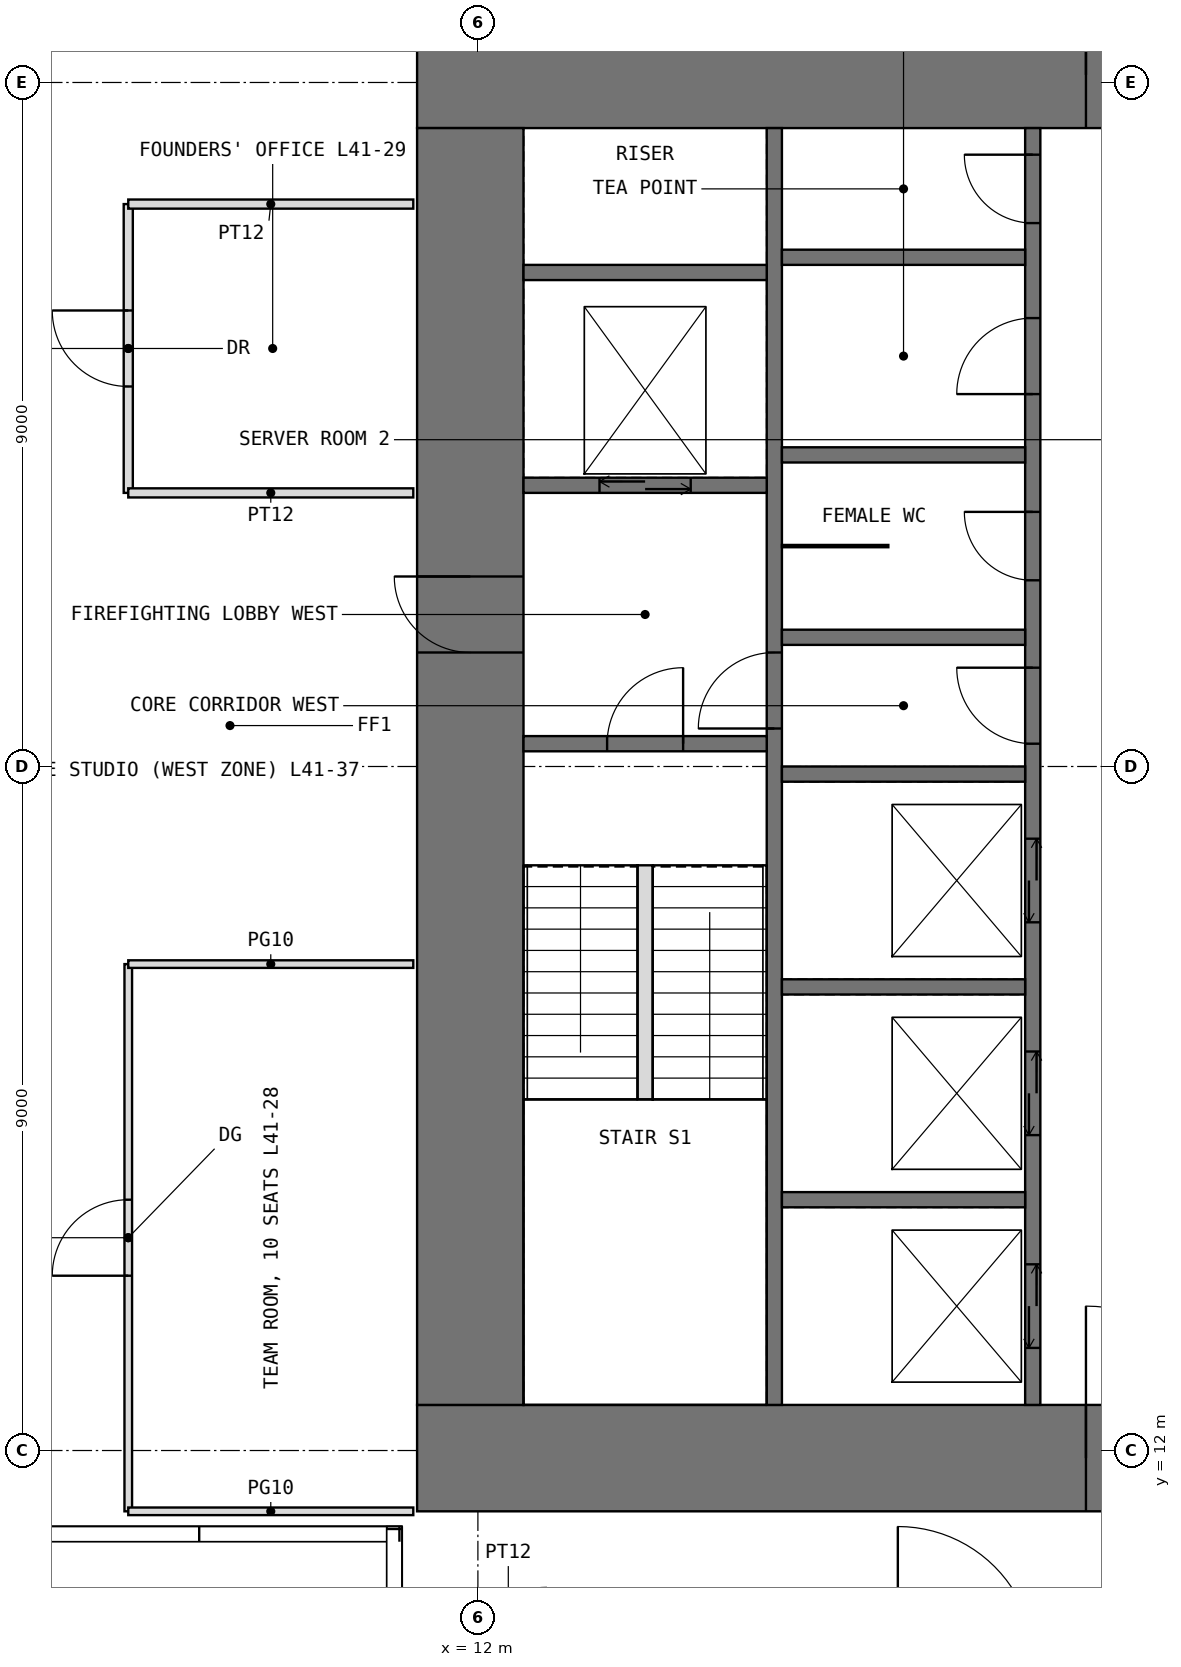
"""IFC4 building model, lengths in metres.
Left out: names, types, materials, properties, quantities, classifications, styles, units other than length and angle.
Written with IfcOpenShell. Run it as: python <this file> out.ifc"""

import sys

from ifc_helpers import new_model, si_unit, direction, frame, frame_2d, origin, place, context, subcontext, project, spatial, rectangle, extrude, element, fill, save


model = new_model("IFC4")
c1 = context("Model", 3, precision=1e-05, world=origin(), true_north=direction((0.0, 1.0)))
c2 = subcontext(c1, "Body", "Model", "MODEL_VIEW")
j1 = project(units=[si_unit("LENGTHUNIT", "METRE"), si_unit("PLANEANGLEUNIT", "RADIAN")], contexts=[c1])
p1 = place(None, origin())
s1 = spatial("IfcSite", under=j1, at=p1, CompositionType="ELEMENT")
p2 = place(p1, origin())
s2 = spatial("IfcBuilding", under=s1, at=p2, CompositionType="ELEMENT")
p3 = place(p2, frame((0.0, 0.0, 174.5)))
s3 = spatial("IfcBuildingStorey", under=s2, at=p3, CompositionType="ELEMENT", Elevation=174.5)
p4 = place(p3, frame((11.2, 11.9, -0.05), z_axis=(0.0, 0.0, 1.0), x_axis=(1.0, 0.0, 0.0)))
e1 = element("IfcWall", 1, at=p4, inside=s3, PredefinedType="SHEAR", context=c2, shape_type="SweptSolid", body=[
    extrude(rectangle(XDim=19.6, YDim=1.4, at=frame_2d((9.8, 0.0))), origin(), (0.0, 0.0, 1.0), 4.0),
])
p5 = place(p4, frame((8.8, 0.0, 0.05)))
e2 = element("IfcOpeningElement", 2, at=p5, cuts=e1, PredefinedType="OPENING", context=c2, shape_type="SweptSolid", body=[
    extrude(rectangle(XDim=2.0, YDim=2.2, at=frame_2d((1.0, 1.1))), frame((0.0, 0.71, 0.0), z_axis=(0.0, -1.0, 0.0), x_axis=(1.0, 0.0, 0.0)), (0.0, 0.0, 1.0), 1.42),
])
p6 = place(p3, frame((11.2, 30.1, -0.05), z_axis=(0.0, 0.0, 1.0), x_axis=(1.0, 0.0, 0.0)))
e3 = element("IfcWall", 3, at=p6, inside=s3, PredefinedType="SHEAR", context=c2, shape_type="SweptSolid", body=[
    extrude(rectangle(XDim=19.6, YDim=1.4, at=frame_2d((9.8, 0.0))), origin(), (0.0, 0.0, 1.0), 4.0),
])
p7 = place(p6, frame((8.8, 0.0, 0.05)))
e4 = element("IfcOpeningElement", 4, at=p7, cuts=e3, PredefinedType="OPENING", context=c2, shape_type="SweptSolid", body=[
    extrude(rectangle(XDim=2.0, YDim=2.2, at=frame_2d((1.0, 1.1))), frame((0.0, 0.71, 0.0), z_axis=(0.0, -1.0, 0.0), x_axis=(1.0, 0.0, 0.0)), (0.0, 0.0, 1.0), 1.42),
])
p8 = place(p3, frame((11.9, 12.6, -0.05), z_axis=(0.0, 0.0, 1.0), x_axis=(0.0, 1.0, 0.0)))
e5 = element("IfcWall", 5, at=p8, inside=s3, PredefinedType="SHEAR", context=c2, shape_type="SweptSolid", body=[
    extrude(rectangle(XDim=16.8, YDim=1.4, at=frame_2d((8.4, 0.0))), origin(), (0.0, 0.0, 1.0), 4.0),
])
p9 = place(p8, frame((9.9, 0.0, 0.05)))
e6 = element("IfcOpeningElement", 6, at=p9, cuts=e5, PredefinedType="OPENING", context=c2, shape_type="SweptSolid", body=[
    extrude(rectangle(XDim=1.0, YDim=2.2, at=frame_2d((0.5, 1.1))), frame((0.0, 0.71, 0.0), z_axis=(0.0, -1.0, 0.0), x_axis=(1.0, 0.0, 0.0)), (0.0, 0.0, 1.0), 1.42),
])
p10 = place(p3, frame((15.9, 12.6, -0.05), z_axis=(0.0, 0.0, 1.0), x_axis=(0.0, 1.0, 0.0)))
e7 = element("IfcWall", 7, at=p10, inside=s3, PredefinedType="SHEAR", context=c2, shape_type="SweptSolid", body=[
    extrude(rectangle(XDim=16.8, YDim=0.2, at=frame_2d((8.4, 0.0))), origin(), (0.0, 0.0, 1.0), 4.0),
])
p11 = place(p10, frame((8.9, 0.0, 0.05)))
e8 = element("IfcOpeningElement", 8, at=p11, cuts=e7, PredefinedType="OPENING", context=c2, shape_type="SweptSolid", body=[
    extrude(rectangle(XDim=1.0, YDim=2.2, at=frame_2d((0.5, 1.1))), frame((0.0, 0.11, 0.0), z_axis=(0.0, -1.0, 0.0), x_axis=(1.0, 0.0, 0.0)), (0.0, 0.0, 1.0), 0.22),
])
p12 = place(p3, frame((19.3, 12.6, -0.05), z_axis=(0.0, 0.0, 1.0), x_axis=(0.0, 1.0, 0.0)))
e9 = element("IfcWall", 9, at=p12, inside=s3, PredefinedType="SHEAR", context=c2, shape_type="SweptSolid", body=[
    extrude(rectangle(XDim=16.8, YDim=0.2, at=frame_2d((8.4, 0.0))), origin(), (0.0, 0.0, 1.0), 4.0),
])
p13 = place(p12, frame((8.7, 0.0, 0.05)))
e10 = element("IfcOpeningElement", 10, at=p13, cuts=e9, PredefinedType="OPENING", context=c2, shape_type="SweptSolid", body=[
    extrude(rectangle(XDim=1.0, YDim=2.2, at=frame_2d((0.5, 1.1))), frame((0.0, 0.11, 0.0), z_axis=(0.0, -1.0, 0.0), x_axis=(1.0, 0.0, 0.0)), (0.0, 0.0, 1.0), 0.22),
])
p14 = place(p12, frame((10.85, 0.0, 0.05)))
e11 = element("IfcOpeningElement", 11, at=p14, cuts=e9, PredefinedType="OPENING", context=c2, shape_type="SweptSolid", body=[
    extrude(rectangle(XDim=0.9, YDim=2.2, at=frame_2d((0.45, 1.1))), frame((0.0, 0.11, 0.0), z_axis=(0.0, -1.0, 0.0), x_axis=(1.0, 0.0, 0.0)), (0.0, 0.0, 1.0), 0.22),
])
p15 = place(p12, frame((13.3, 0.0, 0.05)))
e12 = element("IfcOpeningElement", 12, at=p15, cuts=e9, PredefinedType="OPENING", context=c2, shape_type="SweptSolid", body=[
    extrude(rectangle(XDim=1.0, YDim=2.2, at=frame_2d((0.5, 1.1))), frame((0.0, 0.11, 0.0), z_axis=(0.0, -1.0, 0.0), x_axis=(1.0, 0.0, 0.0)), (0.0, 0.0, 1.0), 0.22),
])
p16 = place(p12, frame((15.55, 0.0, 0.05)))
e13 = element("IfcOpeningElement", 13, at=p16, cuts=e9, PredefinedType="OPENING", context=c2, shape_type="SweptSolid", body=[
    extrude(rectangle(XDim=0.9, YDim=2.2, at=frame_2d((0.45, 1.1))), frame((0.0, 0.11, 0.0), z_axis=(0.0, -1.0, 0.0), x_axis=(1.0, 0.0, 0.0)), (0.0, 0.0, 1.0), 0.22),
])
p17 = place(p12, frame((0.75, 0.0, 0.05)))
e14 = element("IfcOpeningElement", 14, at=p17, cuts=e9, PredefinedType="OPENING", context=c2, shape_type="SweptSolid", body=[
    extrude(rectangle(XDim=1.1, YDim=2.2, at=frame_2d((0.55, 1.1))), frame((0.0, 0.11, 0.0), z_axis=(0.0, -1.0, 0.0), x_axis=(1.0, 0.0, 0.0)), (0.0, 0.0, 1.0), 0.22),
])
p18 = place(p12, frame((3.55, 0.0, 0.05)))
e15 = element("IfcOpeningElement", 15, at=p18, cuts=e9, PredefinedType="OPENING", context=c2, shape_type="SweptSolid", body=[
    extrude(rectangle(XDim=1.1, YDim=2.2, at=frame_2d((0.55, 1.1))), frame((0.0, 0.11, 0.0), z_axis=(0.0, -1.0, 0.0), x_axis=(1.0, 0.0, 0.0)), (0.0, 0.0, 1.0), 0.22),
])
p19 = place(p12, frame((6.35, 0.0, 0.05)))
e16 = element("IfcOpeningElement", 16, at=p19, cuts=e9, PredefinedType="OPENING", context=c2, shape_type="SweptSolid", body=[
    extrude(rectangle(XDim=1.1, YDim=2.2, at=frame_2d((0.55, 1.1))), frame((0.0, 0.11, 0.0), z_axis=(0.0, -1.0, 0.0), x_axis=(1.0, 0.0, 0.0)), (0.0, 0.0, 1.0), 0.22),
])
p20 = place(p3, frame((12.6, 21.3, -0.05), z_axis=(0.0, 0.0, 1.0), x_axis=(1.0, 0.0, 0.0)))
e17 = element("IfcWall", 17, at=p20, inside=s3, PredefinedType="SHEAR", context=c2, shape_type="SweptSolid", body=[
    extrude(rectangle(XDim=3.2, YDim=0.2, at=frame_2d((1.6, 0.0))), origin(), (0.0, 0.0, 1.0), 4.0),
])
p21 = place(p20, frame((1.1, 0.0, 0.05)))
e18 = element("IfcOpeningElement", 18, at=p21, cuts=e17, PredefinedType="OPENING", context=c2, shape_type="SweptSolid", body=[
    extrude(rectangle(XDim=1.0, YDim=2.2, at=frame_2d((0.5, 1.1))), frame((0.0, 0.11, 0.0), z_axis=(0.0, -1.0, 0.0), x_axis=(1.0, 0.0, 0.0)), (0.0, 0.0, 1.0), 0.22),
])
p22 = place(p3, frame((12.6, 24.7, -0.05), z_axis=(0.0, 0.0, 1.0), x_axis=(1.0, 0.0, 0.0)))
e19 = element("IfcWall", 19, at=p22, inside=s3, PredefinedType="SHEAR", context=c2, shape_type="SweptSolid", body=[
    extrude(rectangle(XDim=3.2, YDim=0.2, at=frame_2d((1.6, 0.0))), origin(), (0.0, 0.0, 1.0), 4.0),
])
p23 = place(p22, frame((1.0, 0.0, 0.05)))
e20 = element("IfcOpeningElement", 20, at=p23, cuts=e19, PredefinedType="OPENING", context=c2, shape_type="SweptSolid", body=[
    extrude(rectangle(XDim=1.2, YDim=2.2, at=frame_2d((0.6, 1.1))), frame((0.0, 0.11, 0.0), z_axis=(0.0, -1.0, 0.0), x_axis=(1.0, 0.0, 0.0)), (0.0, 0.0, 1.0), 0.22),
])
for number, where, z_axis, x_axis in (
    (21, (12.6, 27.5, -0.05), (0.0, 0.0, 1.0), (1.0, 0.0, 0.0)),
    (22, (16.0, 15.3, -0.05), (0.0, 0.0, 1.0), (1.0, 0.0, 0.0)),
    (23, (16.0, 18.1, -0.05), (0.0, 0.0, 1.0), (1.0, 0.0, 0.0)),
    (24, (16.0, 20.9, -0.05), (0.0, 0.0, 1.0), (1.0, 0.0, 0.0)),
    (25, (16.0, 22.7, -0.05), (0.0, 0.0, 1.0), (1.0, 0.0, 0.0)),
    (26, (16.0, 25.1, -0.05), (0.0, 0.0, 1.0), (1.0, 0.0, 0.0)),
    (27, (16.0, 27.7, -0.05), (0.0, 0.0, 1.0), (1.0, 0.0, 0.0)),
):
    element("IfcWall", number, at=place(p3, frame(where, z_axis=z_axis, x_axis=x_axis)), inside=s3, PredefinedType="SHEAR", context=c2, shape_type="SweptSolid", body=[
        extrude(rectangle(XDim=3.2, YDim=0.2, at=frame_2d((1.6, 0.0))), origin(), (0.0, 0.0, 1.0), 4.0),
    ])
p24 = place(p3, frame((16.0, 23.9, 0.0), z_axis=(0.0, 0.0, 1.0), x_axis=(1.0, 0.0, 0.0)))
e28 = element("IfcWall", 28, at=p24, inside=s3, PredefinedType="PARTITIONING", context=c2, shape_type="SweptSolid", body=[
    extrude(rectangle(XDim=1.4, YDim=0.03, at=frame_2d((0.7, 0.0))), origin(), (0.0, 0.0, 1.0), 3.75),
])
p25 = place(p3, frame((7.4, 11.2, 0.0), z_axis=(0.0, 0.0, 1.0), x_axis=(0.0, 1.0, 0.0)))
e29 = element("IfcWall", 29, at=p25, inside=s3, PredefinedType="PARTITIONING", context=c2, shape_type="SweptSolid", body=[
    extrude(rectangle(XDim=7.2, YDim=0.1, at=frame_2d((3.6, 0.0))), origin(), (0.0, 0.0, 1.0), 3.75),
])
p26 = place(p25, frame((3.1, 0.0, 0.0)))
e30 = element("IfcOpeningElement", 30, at=p26, cuts=e29, PredefinedType="OPENING", context=c2, shape_type="SweptSolid", body=[
    extrude(rectangle(XDim=1.0, YDim=2.4, at=frame_2d((0.5, 1.2))), frame((0.0, 0.06, 0.0), z_axis=(0.0, -1.0, 0.0), x_axis=(1.0, 0.0, 0.0)), (0.0, 0.0, 1.0), 0.12),
])
for number, where, z_axis, x_axis in (
    (31, (7.4, 11.2, 0.0), (0.0, 0.0, 1.0), (1.0, 0.0, 0.0)),
    (32, (7.4, 18.4, 0.0), (0.0, 0.0, 1.0), (1.0, 0.0, 0.0)),
):
    element("IfcWall", number, at=place(p3, frame(where, z_axis=z_axis, x_axis=x_axis)), inside=s3, PredefinedType="PARTITIONING", context=c2, shape_type="SweptSolid", body=[
        extrude(rectangle(XDim=3.75, YDim=0.1, at=frame_2d((1.875, 0.0))), origin(), (0.0, 0.0, 1.0), 3.75),
    ])
p27 = place(p3, frame((7.4, 24.6, 0.0), z_axis=(0.0, 0.0, 1.0), x_axis=(0.0, 1.0, 0.0)))
e33 = element("IfcWall", 33, at=p27, inside=s3, PredefinedType="PARTITIONING", context=c2, shape_type="SweptSolid", body=[
    extrude(rectangle(XDim=3.8, YDim=0.12, at=frame_2d((1.9, 0.0))), origin(), (0.0, 0.0, 1.0), 3.75),
])
p28 = place(p27, frame((1.4, 0.0, 0.0)))
e34 = element("IfcOpeningElement", 34, at=p28, cuts=e33, PredefinedType="OPENING", context=c2, shape_type="SweptSolid", body=[
    extrude(rectangle(XDim=1.0, YDim=2.2, at=frame_2d((0.5, 1.1))), frame((0.0, 0.07, 0.0), z_axis=(0.0, -1.0, 0.0), x_axis=(1.0, 0.0, 0.0)), (0.0, 0.0, 1.0), 0.14),
])
for number, where, z_axis, x_axis in (
    (35, (7.4, 24.6, 0.0), (0.0, 0.0, 1.0), (1.0, 0.0, 0.0)),
    (36, (7.4, 28.4, 0.0), (0.0, 0.0, 1.0), (1.0, 0.0, 0.0)),
):
    element("IfcWall", number, at=place(p3, frame(where, z_axis=z_axis, x_axis=x_axis)), inside=s3, PredefinedType="PARTITIONING", context=c2, shape_type="SweptSolid", body=[
        extrude(rectangle(XDim=3.75, YDim=0.12, at=frame_2d((1.875, 0.0))), origin(), (0.0, 0.0, 1.0), 3.75),
    ])
p29 = place(p3, frame((14.2, 16.62, 0.0), z_axis=(0.0, 0.0, 1.0), x_axis=(0.0, 1.0, 0.0)))
e37 = element("IfcWall", 37, at=p29, inside=s3, PredefinedType="PARTITIONING", context=c2, shape_type="SweptSolid", body=[
    extrude(rectangle(XDim=3.08, YDim=0.2, at=frame_2d((1.54, 0.0))), origin(), (0.0, 0.0, 1.0), 4.0),
])
p30 = place(p5, origin())
e38 = element("IfcDoor", 38, at=p30, inside=s3, OperationType="DOUBLE_DOOR_SINGLE_SWING", PredefinedType="DOOR", context=c2, shape_type="SweptSolid", body=[
    extrude(rectangle(XDim=2.0, YDim=2.2, at=frame_2d((1.0, 1.1))), frame((0.0, 0.025, 0.0), z_axis=(0.0, -1.0, 0.0), x_axis=(1.0, 0.0, 0.0)), (0.0, 0.0, 1.0), 0.05),
])
fill(e2, e38)
p31 = place(p7, origin())
e39 = element("IfcDoor", 39, at=p31, inside=s3, OperationType="DOUBLE_DOOR_SINGLE_SWING", PredefinedType="DOOR", context=c2, shape_type="SweptSolid", body=[
    extrude(rectangle(XDim=2.0, YDim=2.2, at=frame_2d((1.0, 1.1))), frame((0.0, 0.025, 0.0), z_axis=(0.0, -1.0, 0.0), x_axis=(1.0, 0.0, 0.0)), (0.0, 0.0, 1.0), 0.05),
])
fill(e4, e39)
p32 = place(p9, origin())
e40 = element("IfcDoor", 40, at=p32, inside=s3, OperationType="SINGLE_SWING_RIGHT", PredefinedType="DOOR", context=c2, shape_type="SweptSolid", body=[
    extrude(rectangle(XDim=1.0, YDim=2.2, at=frame_2d((0.5, 1.1))), frame((0.0, 0.025, 0.0), z_axis=(0.0, -1.0, 0.0), x_axis=(1.0, 0.0, 0.0)), (0.0, 0.0, 1.0), 0.05),
])
fill(e6, e40)
p33 = place(p21, origin())
e41 = element("IfcDoor", 41, at=p33, inside=s3, OperationType="SINGLE_SWING_RIGHT", PredefinedType="DOOR", context=c2, shape_type="SweptSolid", body=[
    extrude(rectangle(XDim=1.0, YDim=2.2, at=frame_2d((0.5, 1.1))), frame((0.0, 0.025, 0.0), z_axis=(0.0, -1.0, 0.0), x_axis=(1.0, 0.0, 0.0)), (0.0, 0.0, 1.0), 0.05),
])
fill(e18, e41)
p34 = place(p11, origin())
e42 = element("IfcDoor", 42, at=p34, inside=s3, OperationType="SINGLE_SWING_LEFT", PredefinedType="DOOR", context=c2, shape_type="SweptSolid", body=[
    extrude(rectangle(XDim=1.0, YDim=2.2, at=frame_2d((0.5, 1.1))), frame((0.0, 0.025, 0.0), z_axis=(0.0, -1.0, 0.0), x_axis=(1.0, 0.0, 0.0)), (0.0, 0.0, 1.0), 0.05),
])
fill(e8, e42)
p35 = place(p13, origin())
e43 = element("IfcDoor", 43, at=p35, inside=s3, OperationType="SINGLE_SWING_RIGHT", PredefinedType="DOOR", context=c2, shape_type="SweptSolid", body=[
    extrude(rectangle(XDim=1.0, YDim=2.2, at=frame_2d((0.5, 1.1))), frame((0.0, 0.025, 0.0), z_axis=(0.0, -1.0, 0.0), x_axis=(1.0, 0.0, 0.0)), (0.0, 0.0, 1.0), 0.05),
])
fill(e10, e43)
p36 = place(p14, origin())
e44 = element("IfcDoor", 44, at=p36, inside=s3, OperationType="SINGLE_SWING_RIGHT", PredefinedType="DOOR", context=c2, shape_type="SweptSolid", body=[
    extrude(rectangle(XDim=0.9, YDim=2.2, at=frame_2d((0.45, 1.1))), frame((0.0, 0.025, 0.0), z_axis=(0.0, -1.0, 0.0), x_axis=(1.0, 0.0, 0.0)), (0.0, 0.0, 1.0), 0.05),
])
fill(e11, e44)
p37 = place(p15, origin())
e45 = element("IfcDoor", 45, at=p37, inside=s3, OperationType="SINGLE_SWING_LEFT", PredefinedType="DOOR", context=c2, shape_type="SweptSolid", body=[
    extrude(rectangle(XDim=1.0, YDim=2.2, at=frame_2d((0.5, 1.1))), frame((0.0, 0.025, 0.0), z_axis=(0.0, -1.0, 0.0), x_axis=(1.0, 0.0, 0.0)), (0.0, 0.0, 1.0), 0.05),
])
fill(e12, e45)
p38 = place(p16, origin())
e46 = element("IfcDoor", 46, at=p38, inside=s3, OperationType="SINGLE_SWING_RIGHT", PredefinedType="DOOR", context=c2, shape_type="SweptSolid", body=[
    extrude(rectangle(XDim=0.9, YDim=2.2, at=frame_2d((0.45, 1.1))), frame((0.0, 0.025, 0.0), z_axis=(0.0, -1.0, 0.0), x_axis=(1.0, 0.0, 0.0)), (0.0, 0.0, 1.0), 0.05),
])
fill(e13, e46)
p39 = place(p26, origin())
e47 = element("IfcDoor", 47, at=p39, inside=s3, OperationType="SINGLE_SWING_LEFT", PredefinedType="DOOR", context=c2, shape_type="SweptSolid", body=[
    extrude(rectangle(XDim=1.0, YDim=2.4, at=frame_2d((0.5, 1.2))), frame((0.0, 0.025, 0.0), z_axis=(0.0, -1.0, 0.0), x_axis=(1.0, 0.0, 0.0)), (0.0, 0.0, 1.0), 0.05),
])
fill(e30, e47)
p40 = place(p28, origin())
e48 = element("IfcDoor", 48, at=p40, inside=s3, OperationType="SINGLE_SWING_RIGHT", PredefinedType="DOOR", context=c2, shape_type="SweptSolid", body=[
    extrude(rectangle(XDim=1.0, YDim=2.2, at=frame_2d((0.5, 1.1))), frame((0.0, 0.025, 0.0), z_axis=(0.0, -1.0, 0.0), x_axis=(1.0, 0.0, 0.0)), (0.0, 0.0, 1.0), 0.05),
])
fill(e34, e48)
p41 = place(p17, origin())
e49 = element("IfcDoor", 49, at=p41, inside=s3, OperationType="DOUBLE_DOOR_SLIDING", PredefinedType="DOOR", context=c2, shape_type="SweptSolid", body=[
    extrude(rectangle(XDim=1.1, YDim=2.2, at=frame_2d((0.55, 1.1))), frame((0.0, 0.025, 0.0), z_axis=(0.0, -1.0, 0.0), x_axis=(1.0, 0.0, 0.0)), (0.0, 0.0, 1.0), 0.05),
])
fill(e14, e49)
p42 = place(p18, origin())
e50 = element("IfcDoor", 50, at=p42, inside=s3, OperationType="DOUBLE_DOOR_SLIDING", PredefinedType="DOOR", context=c2, shape_type="SweptSolid", body=[
    extrude(rectangle(XDim=1.1, YDim=2.2, at=frame_2d((0.55, 1.1))), frame((0.0, 0.025, 0.0), z_axis=(0.0, -1.0, 0.0), x_axis=(1.0, 0.0, 0.0)), (0.0, 0.0, 1.0), 0.05),
])
fill(e15, e50)
p43 = place(p19, origin())
e51 = element("IfcDoor", 51, at=p43, inside=s3, OperationType="DOUBLE_DOOR_SLIDING", PredefinedType="DOOR", context=c2, shape_type="SweptSolid", body=[
    extrude(rectangle(XDim=1.1, YDim=2.2, at=frame_2d((0.55, 1.1))), frame((0.0, 0.025, 0.0), z_axis=(0.0, -1.0, 0.0), x_axis=(1.0, 0.0, 0.0)), (0.0, 0.0, 1.0), 0.05),
])
fill(e16, e51)
p44 = place(p23, origin())
e52 = element("IfcDoor", 52, at=p44, inside=s3, OperationType="DOUBLE_DOOR_SLIDING", PredefinedType="DOOR", context=c2, shape_type="SweptSolid", body=[
    extrude(rectangle(XDim=1.2, YDim=2.2, at=frame_2d((0.6, 1.1))), frame((0.0, 0.025, 0.0), z_axis=(0.0, -1.0, 0.0), x_axis=(1.0, 0.0, 0.0)), (0.0, 0.0, 1.0), 0.05),
])
fill(e20, e52)
save(model, sys.argv[1])
